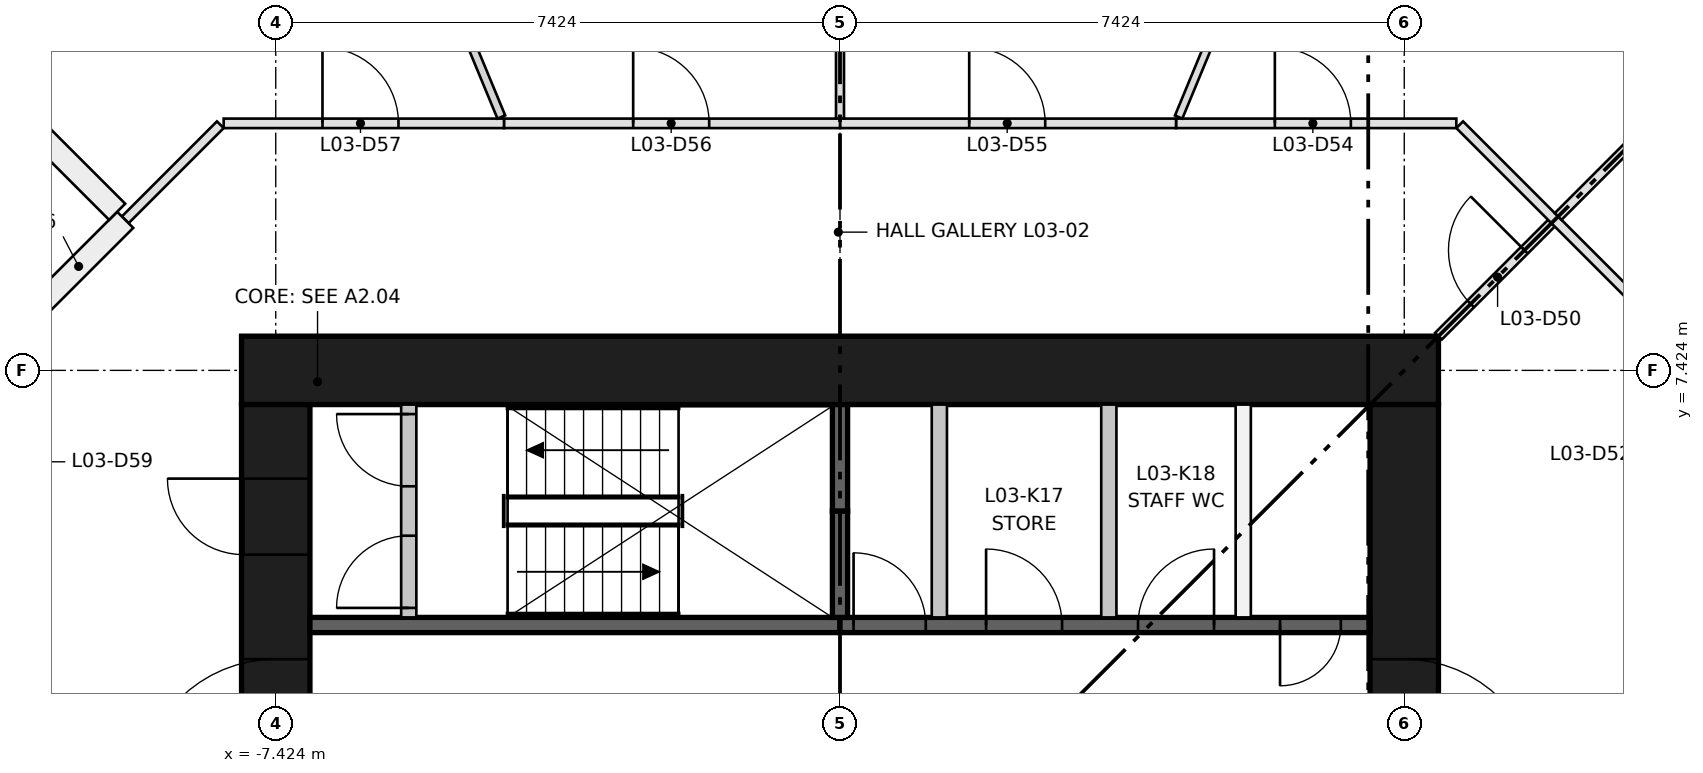
"""IFC4 building model, lengths in metres.
Left out: names, types, materials, properties, quantities, classifications, styles, units other than length and angle.
Written with IfcOpenShell. Run it as: python <this file> out.ifc"""

import sys

from ifc_helpers import new_model, si_unit, direction, frame, frame_2d, origin, place, context, subcontext, project, spatial, rectangle, extrude, element, fill, save


model = new_model("IFC4")
c1 = context("Model", 3, precision=1e-05, world=origin(), true_north=direction((0.0, 1.0)))
c2 = subcontext(c1, "Body", "Model", "MODEL_VIEW")
j1 = project(units=[si_unit("LENGTHUNIT", "METRE"), si_unit("PLANEANGLEUNIT", "RADIAN")], contexts=[c1])
p1 = place(None, origin())
s1 = spatial("IfcSite", under=j1, at=p1, CompositionType="ELEMENT")
p2 = place(p1, origin())
s2 = spatial("IfcBuilding", under=s1, at=p2, CompositionType="ELEMENT")
p3 = place(p2, frame((0.0, 0.0, 14.4)))
s3 = spatial("IfcBuildingStorey", under=s2, at=p3, CompositionType="ELEMENT", Elevation=14.4)
p4 = place(p3, frame((-7.874, 7.424, 0.0), z_axis=(0.0, 0.0, 1.0), x_axis=(1.0, 0.0, 0.0)))
e1 = element("IfcWall", 1, at=p4, inside=s3, PredefinedType="SHEAR", context=c2, shape_type="SweptSolid", body=[
    extrude(rectangle(XDim=15.748, YDim=0.9, at=frame_2d((7.874, 0.0))), origin(), (0.0, 0.0, 1.0), 4.1),
])
p5 = place(p3, frame((-7.424, -6.974, 0.0), z_axis=(0.0, 0.0, 1.0), x_axis=(0.0, 1.0, 0.0)))
e2 = element("IfcWall", 2, at=p5, inside=s3, PredefinedType="SHEAR", context=c2, shape_type="SweptSolid", body=[
    extrude(rectangle(XDim=13.948, YDim=0.9, at=frame_2d((6.974, 0.0))), origin(), (0.0, 0.0, 1.0), 4.1),
])
p6 = place(p5, frame((6.474, 0.0, 0.0)))
e3 = element("IfcOpeningElement", 3, at=p6, cuts=e2, PredefinedType="OPENING", context=c2, shape_type="SweptSolid", body=[
    extrude(rectangle(XDim=1.0, YDim=2.1, at=frame_2d((0.5, 1.05))), frame((0.0, 0.46, 0.0), z_axis=(0.0, -1.0, 0.0), x_axis=(1.0, 0.0, 0.0)), (0.0, 0.0, 1.0), 0.92),
])
p7 = place(p5, frame((3.35, 0.0, 0.0)))
e4 = element("IfcOpeningElement", 4, at=p7, cuts=e2, PredefinedType="OPENING", context=c2, shape_type="SweptSolid", body=[
    extrude(rectangle(XDim=1.8, YDim=2.1, at=frame_2d((0.9, 1.05))), frame((0.0, 0.46, 0.0), z_axis=(0.0, -1.0, 0.0), x_axis=(1.0, 0.0, 0.0)), (0.0, 0.0, 1.0), 0.92),
])
p8 = place(p5, frame((8.799, 0.0, 0.0)))
e5 = element("IfcOpeningElement", 5, at=p8, cuts=e2, PredefinedType="OPENING", context=c2, shape_type="SweptSolid", body=[
    extrude(rectangle(XDim=1.8, YDim=2.1, at=frame_2d((0.9, 1.05))), frame((0.0, 0.46, 0.0), z_axis=(0.0, -1.0, 0.0), x_axis=(1.0, 0.0, 0.0)), (0.0, 0.0, 1.0), 0.92),
])
p9 = place(p5, frame((11.974, 0.0, 0.0)))
e6 = element("IfcOpeningElement", 6, at=p9, cuts=e2, PredefinedType="OPENING", context=c2, shape_type="SweptSolid", body=[
    extrude(rectangle(XDim=1.0, YDim=2.1, at=frame_2d((0.5, 1.05))), frame((0.0, 0.46, 0.0), z_axis=(0.0, -1.0, 0.0), x_axis=(1.0, 0.0, 0.0)), (0.0, 0.0, 1.0), 0.92),
])
p10 = place(p3, frame((7.424, -6.974, 0.0), z_axis=(0.0, 0.0, 1.0), x_axis=(0.0, 1.0, 0.0)))
e7 = element("IfcWall", 7, at=p10, inside=s3, PredefinedType="SHEAR", context=c2, shape_type="SweptSolid", body=[
    extrude(rectangle(XDim=13.948, YDim=0.9, at=frame_2d((6.974, 0.0))), origin(), (0.0, 0.0, 1.0), 4.1),
])
p11 = place(p10, frame((6.474, 0.0, 0.0)))
e8 = element("IfcOpeningElement", 8, at=p11, cuts=e7, PredefinedType="OPENING", context=c2, shape_type="SweptSolid", body=[
    extrude(rectangle(XDim=1.0, YDim=2.1, at=frame_2d((0.5, 1.05))), frame((0.0, 0.46, 0.0), z_axis=(0.0, -1.0, 0.0), x_axis=(1.0, 0.0, 0.0)), (0.0, 0.0, 1.0), 0.92),
])
p12 = place(p10, frame((3.35, 0.0, 0.0)))
e9 = element("IfcOpeningElement", 9, at=p12, cuts=e7, PredefinedType="OPENING", context=c2, shape_type="SweptSolid", body=[
    extrude(rectangle(XDim=1.8, YDim=2.1, at=frame_2d((0.9, 1.05))), frame((0.0, 0.46, 0.0), z_axis=(0.0, -1.0, 0.0), x_axis=(1.0, 0.0, 0.0)), (0.0, 0.0, 1.0), 0.92),
])
p13 = place(p10, frame((8.799, 0.0, 0.0)))
e10 = element("IfcOpeningElement", 10, at=p13, cuts=e7, PredefinedType="OPENING", context=c2, shape_type="SweptSolid", body=[
    extrude(rectangle(XDim=1.8, YDim=2.1, at=frame_2d((0.9, 1.05))), frame((0.0, 0.46, 0.0), z_axis=(0.0, -1.0, 0.0), x_axis=(1.0, 0.0, 0.0)), (0.0, 0.0, 1.0), 0.92),
])
p14 = place(p3, frame((-6.974, 4.074, 0.0), z_axis=(0.0, 0.0, 1.0), x_axis=(1.0, 0.0, 0.0)))
e11 = element("IfcWall", 11, at=p14, inside=s3, PredefinedType="SHEAR", context=c2, shape_type="SweptSolid", body=[
    extrude(rectangle(XDim=6.974, YDim=0.2, at=frame_2d((3.487, 0.0))), origin(), (0.0, 0.0, 1.0), 3.7),
])
p15 = place(p3, frame((0.0, 4.074, 0.0), z_axis=(0.0, 0.0, 1.0), x_axis=(1.0, 0.0, 0.0)))
e12 = element("IfcWall", 12, at=p15, inside=s3, PredefinedType="SHEAR", context=c2, shape_type="SweptSolid", body=[
    extrude(rectangle(XDim=6.974, YDim=0.2, at=frame_2d((3.487, 0.0))), origin(), (0.0, 0.0, 1.0), 3.7),
])
p16 = place(p15, frame((0.179, 0.0, 0.0)))
e13 = element("IfcOpeningElement", 13, at=p16, cuts=e12, PredefinedType="OPENING", context=c2, shape_type="SweptSolid", body=[
    extrude(rectangle(XDim=0.95, YDim=2.1, at=frame_2d((0.475, 1.05))), frame((0.0, 0.11, 0.0), z_axis=(0.0, -1.0, 0.0), x_axis=(1.0, 0.0, 0.0)), (0.0, 0.0, 1.0), 0.22),
])
p17 = place(p15, frame((1.922, 0.0, 0.0)))
e14 = element("IfcOpeningElement", 14, at=p17, cuts=e12, PredefinedType="OPENING", context=c2, shape_type="SweptSolid", body=[
    extrude(rectangle(XDim=1.0, YDim=2.1, at=frame_2d((0.5, 1.05))), frame((0.0, 0.11, 0.0), z_axis=(0.0, -1.0, 0.0), x_axis=(1.0, 0.0, 0.0)), (0.0, 0.0, 1.0), 0.22),
])
p18 = place(p15, frame((3.921, 0.0, 0.0)))
e15 = element("IfcOpeningElement", 15, at=p18, cuts=e12, PredefinedType="OPENING", context=c2, shape_type="SweptSolid", body=[
    extrude(rectangle(XDim=1.0, YDim=2.1, at=frame_2d((0.5, 1.05))), frame((0.0, 0.11, 0.0), z_axis=(0.0, -1.0, 0.0), x_axis=(1.0, 0.0, 0.0)), (0.0, 0.0, 1.0), 0.22),
])
p19 = place(p15, frame((5.79, 0.0, 0.0)))
e16 = element("IfcOpeningElement", 16, at=p19, cuts=e12, PredefinedType="OPENING", context=c2, shape_type="SweptSolid", body=[
    extrude(rectangle(XDim=0.8, YDim=2.1, at=frame_2d((0.4, 1.05))), frame((0.0, 0.11, 0.0), z_axis=(0.0, -1.0, 0.0), x_axis=(1.0, 0.0, 0.0)), (0.0, 0.0, 1.0), 0.22),
])
p20 = place(p3, frame((0.0, 4.174, 0.0), z_axis=(0.0, 0.0, 1.0), x_axis=(0.0, 1.0, 0.0)))
e17 = element("IfcWall", 17, at=p20, inside=s3, PredefinedType="SHEAR", context=c2, shape_type="SweptSolid", body=[
    extrude(rectangle(XDim=1.4, YDim=0.2, at=frame_2d((0.7, 0.0))), origin(), (0.0, 0.0, 1.0), 3.7),
])
p21 = place(p3, frame((0.0, 5.574, 0.0), z_axis=(0.0, 0.0, 1.0), x_axis=(0.0, 1.0, 0.0)))
e18 = element("IfcWall", 18, at=p21, inside=s3, PredefinedType="SHEAR", context=c2, shape_type="SweptSolid", body=[
    extrude(rectangle(XDim=1.4, YDim=0.2, at=frame_2d((0.7, 0.0))), origin(), (0.0, 0.0, 1.0), 3.7),
])
for number, where, z_axis, x_axis in (
    (19, (1.307, 4.174, 0.0), (0.0, 0.0, 1.0), (0.0, 1.0, 0.0)),
    (20, (3.537, 4.174, 0.0), (0.0, 0.0, 1.0), (0.0, 1.0, 0.0)),
    (21, (5.305, 4.174, 0.0), (0.0, 0.0, 1.0), (0.0, 1.0, 0.0)),
):
    element("IfcWall", number, at=place(p3, frame(where, z_axis=z_axis, x_axis=x_axis)), inside=s3, PredefinedType="PARTITIONING", context=c2, shape_type="SweptSolid", body=[
        extrude(rectangle(XDim=2.8, YDim=0.2, at=frame_2d((1.4, 0.0))), origin(), (0.0, 0.0, 1.0), 3.7),
    ])
p22 = place(p3, frame((-5.674, 4.174, 0.0), z_axis=(0.0, 0.0, 1.0), x_axis=(0.0, 1.0, 0.0)))
e22 = element("IfcWall", 22, at=p22, inside=s3, PredefinedType="PARTITIONING", context=c2, shape_type="SweptSolid", body=[
    extrude(rectangle(XDim=2.8, YDim=0.2, at=frame_2d((1.4, 0.0))), origin(), (0.0, 0.0, 1.0), 3.7),
])
p23 = place(p22, frame((0.125, 0.0, 0.0)))
e23 = element("IfcOpeningElement", 23, at=p23, cuts=e22, PredefinedType="OPENING", context=c2, shape_type="SweptSolid", body=[
    extrude(rectangle(XDim=0.95, YDim=2.1, at=frame_2d((0.475, 1.05))), frame((0.0, 0.11, 0.0), z_axis=(0.0, -1.0, 0.0), x_axis=(1.0, 0.0, 0.0)), (0.0, 0.0, 1.0), 0.22),
])
p24 = place(p22, frame((1.725, 0.0, 0.0)))
e24 = element("IfcOpeningElement", 24, at=p24, cuts=e22, PredefinedType="OPENING", context=c2, shape_type="SweptSolid", body=[
    extrude(rectangle(XDim=0.95, YDim=2.1, at=frame_2d((0.475, 1.05))), frame((0.0, 0.11, 0.0), z_axis=(0.0, -1.0, 0.0), x_axis=(1.0, 0.0, 0.0)), (0.0, 0.0, 1.0), 0.22),
])
p25 = place(p3, frame((7.874, 7.874, 0.0), z_axis=(0.0, 0.0, 1.0), x_axis=(0.707106781187, 0.707106781187, 0.0)))
e25 = element("IfcWall", 25, at=p25, inside=s3, PredefinedType="PARTITIONING", context=c2, shape_type="SweptSolid", body=[
    extrude(rectangle(XDim=2.102, YDim=0.125, at=frame_2d((1.051, 0.0))), origin(), (0.0, 0.0, 1.0), 3.7),
])
p26 = place(p25, frame((0.6, 0.0, 0.0)))
e26 = element("IfcOpeningElement", 26, at=p26, cuts=e25, PredefinedType="OPENING", context=c2, shape_type="SweptSolid", body=[
    extrude(rectangle(XDim=1.0, YDim=2.1, at=frame_2d((0.5, 1.05))), frame((0.0, 0.073, 0.0), z_axis=(0.0, -1.0, 0.0), x_axis=(1.0, 0.0, 0.0)), (0.0, 0.0, 1.0), 0.145),
])
p27 = place(p3, frame((9.405, 9.405, 0.0), z_axis=(0.0, 0.0, 1.0), x_axis=(0.707106781187, -0.707106781187, 0.0)))
e27 = element("IfcWall", 27, at=p27, inside=s3, PredefinedType="PARTITIONING", context=c2, shape_type="SweptSolid", body=[
    extrude(rectangle(XDim=1.77, YDim=0.125, at=frame_2d((0.885, 0.0))), origin(), (0.0, 0.0, 1.0), 3.7),
])
p28 = place(p3, frame((4.421, 10.674, 0.0), z_axis=(0.0, 0.0, 1.0), x_axis=(1.0, 0.0, 0.0)))
e28 = element("IfcWall", 28, at=p28, inside=s3, PredefinedType="PARTITIONING", context=c2, shape_type="SweptSolid", body=[
    extrude(rectangle(XDim=3.688, YDim=0.125, at=frame_2d((1.844, 0.0))), origin(), (0.0, 0.0, 1.0), 3.7),
])
p29 = place(p28, frame((1.3, 0.0, 0.0)))
e29 = element("IfcOpeningElement", 29, at=p29, cuts=e28, PredefinedType="OPENING", context=c2, shape_type="SweptSolid", body=[
    extrude(rectangle(XDim=1.0, YDim=2.1, at=frame_2d((0.5, 1.05))), frame((0.0, 0.073, 0.0), z_axis=(0.0, -1.0, 0.0), x_axis=(1.0, 0.0, 0.0)), (0.0, 0.0, 1.0), 0.145),
])
p30 = place(p3, frame((8.153, 10.656, 0.0), z_axis=(0.0, 0.0, 1.0), x_axis=(0.707106781187, -0.707106781187, 0.0)))
e30 = element("IfcWall", 30, at=p30, inside=s3, PredefinedType="PARTITIONING", context=c2, shape_type="SweptSolid", body=[
    extrude(rectangle(XDim=1.77, YDim=0.125, at=frame_2d((0.885, 0.0))), origin(), (0.0, 0.0, 1.0), 3.7),
])
p31 = place(p3, frame((0.0, 10.674, 0.0), z_axis=(0.0, 0.0, 1.0), x_axis=(1.0, 0.0, 0.0)))
e31 = element("IfcWall", 31, at=p31, inside=s3, PredefinedType="PARTITIONING", context=c2, shape_type="SweptSolid", body=[
    extrude(rectangle(XDim=4.421, YDim=0.125, at=frame_2d((2.211, 0.0))), origin(), (0.0, 0.0, 1.0), 3.7),
])
p32 = place(p31, frame((1.7, 0.0, 0.0)))
e32 = element("IfcOpeningElement", 32, at=p32, cuts=e31, PredefinedType="OPENING", context=c2, shape_type="SweptSolid", body=[
    extrude(rectangle(XDim=1.0, YDim=2.1, at=frame_2d((0.5, 1.05))), frame((0.0, 0.073, 0.0), z_axis=(0.0, -1.0, 0.0), x_axis=(1.0, 0.0, 0.0)), (0.0, 0.0, 1.0), 0.145),
])
p33 = place(p3, frame((-4.421, 10.674, 0.0), z_axis=(0.0, 0.0, 1.0), x_axis=(1.0, 0.0, 0.0)))
e33 = element("IfcWall", 33, at=p33, inside=s3, PredefinedType="PARTITIONING", context=c2, shape_type="SweptSolid", body=[
    extrude(rectangle(XDim=4.421, YDim=0.125, at=frame_2d((2.211, 0.0))), origin(), (0.0, 0.0, 1.0), 3.7),
])
p34 = place(p33, frame((1.7, 0.0, 0.0)))
e34 = element("IfcOpeningElement", 34, at=p34, cuts=e33, PredefinedType="OPENING", context=c2, shape_type="SweptSolid", body=[
    extrude(rectangle(XDim=1.0, YDim=2.1, at=frame_2d((0.5, 1.05))), frame((0.0, 0.073, 0.0), z_axis=(0.0, -1.0, 0.0), x_axis=(1.0, 0.0, 0.0)), (0.0, 0.0, 1.0), 0.145),
])
p35 = place(p3, frame((-9.405, 9.405, 0.0), z_axis=(0.0, 0.0, 1.0), x_axis=(0.707106781187, 0.707106781187, 0.0)))
e35 = element("IfcWall", 35, at=p35, inside=s3, PredefinedType="PARTITIONING", context=c2, shape_type="SweptSolid", body=[
    extrude(rectangle(XDim=1.77, YDim=0.125, at=frame_2d((0.885, 0.0))), origin(), (0.0, 0.0, 1.0), 3.7),
])
p36 = place(p3, frame((-8.109, 10.674, 0.0), z_axis=(0.0, 0.0, 1.0), x_axis=(1.0, 0.0, 0.0)))
e36 = element("IfcWall", 36, at=p36, inside=s3, PredefinedType="PARTITIONING", context=c2, shape_type="SweptSolid", body=[
    extrude(rectangle(XDim=3.688, YDim=0.125, at=frame_2d((1.844, 0.0))), origin(), (0.0, 0.0, 1.0), 3.7),
])
p37 = place(p36, frame((1.3, 0.0, 0.0)))
e37 = element("IfcOpeningElement", 37, at=p37, cuts=e36, PredefinedType="OPENING", context=c2, shape_type="SweptSolid", body=[
    extrude(rectangle(XDim=1.0, YDim=2.1, at=frame_2d((0.5, 1.05))), frame((0.0, 0.073, 0.0), z_axis=(0.0, -1.0, 0.0), x_axis=(1.0, 0.0, 0.0)), (0.0, 0.0, 1.0), 0.145),
])
p38 = place(p3, frame((-10.63, 8.179, 0.0), z_axis=(0.0, 0.0, 1.0), x_axis=(0.707106781187, 0.707106781187, 0.0)))
e38 = element("IfcWall", 38, at=p38, inside=s3, PredefinedType="PARTITIONING", context=c2, shape_type="SweptSolid", body=[
    extrude(rectangle(XDim=1.733, YDim=0.3, at=frame_2d((0.867, 0.0))), origin(), (0.0, 0.0, 1.0), 3.7),
])
p39 = place(p3, frame((9.449, 9.449, 0.0), z_axis=(0.0, 0.0, 1.0), x_axis=(0.707106781187, 0.707106781187, 0.0)))
e39 = element("IfcWall", 39, at=p39, inside=s3, PredefinedType="PARTITIONING", context=c2, shape_type="SweptSolid", body=[
    extrude(rectangle(XDim=5.297, YDim=0.125, at=frame_2d((2.649, 0.0))), origin(), (0.0, 0.0, 1.0), 3.7),
])
p40 = place(p3, frame((4.456, 10.757, 0.0), z_axis=(0.0, 0.0, 1.0), x_axis=(0.382663149086, 0.92388793386, 0.0)))
e40 = element("IfcWall", 40, at=p40, inside=s3, PredefinedType="PARTITIONING", context=c2, shape_type="SweptSolid", body=[
    extrude(rectangle(XDim=3.047, YDim=0.105, at=frame_2d((1.523, 0.0))), origin(), (0.0, 0.0, 1.0), 3.7),
])
p41 = place(p3, frame((0.0, 10.737, 0.0), z_axis=(0.0, 0.0, 1.0), x_axis=(0.0, 1.0, 0.0)))
e41 = element("IfcWall", 41, at=p41, inside=s3, PredefinedType="PARTITIONING", context=c2, shape_type="SweptSolid", body=[
    extrude(rectangle(XDim=3.897, YDim=0.105, at=frame_2d((1.949, 0.0))), origin(), (0.0, 0.0, 1.0), 3.7),
])
p42 = place(p3, frame((-4.456, 10.758, 0.0), z_axis=(0.0, 0.0, 1.0), x_axis=(-0.382708078366, 0.923869323418, 0.0)))
e42 = element("IfcWall", 42, at=p42, inside=s3, PredefinedType="PARTITIONING", context=c2, shape_type="SweptSolid", body=[
    extrude(rectangle(XDim=3.046, YDim=0.11, at=frame_2d((1.523, 0.0))), origin(), (0.0, 0.0, 1.0), 3.7),
])
p43 = place(p3, frame((-9.51, 9.51, 0.0), z_axis=(0.0, 0.0, 1.0), x_axis=(-0.707106781187, 0.707106781187, 0.0)))
e43 = element("IfcWall", 43, at=p43, inside=s3, PredefinedType="PARTITIONING", context=c2, shape_type="SweptSolid", body=[
    extrude(rectangle(XDim=5.21, YDim=0.3, at=frame_2d((2.605, 0.0))), origin(), (0.0, 0.0, 1.0), 3.7),
])
p44 = place(p23, origin())
e44 = element("IfcDoor", 44, at=p44, inside=s3, OperationType="SINGLE_SWING_LEFT", PredefinedType="DOOR", context=c2, shape_type="SweptSolid", body=[
    extrude(rectangle(XDim=0.95, YDim=2.1, at=frame_2d((0.475, 1.05))), frame((0.0, 0.025, 0.0), z_axis=(0.0, -1.0, 0.0), x_axis=(1.0, 0.0, 0.0)), (0.0, 0.0, 1.0), 0.05),
])
fill(e23, e44)
p45 = place(p24, origin())
e45 = element("IfcDoor", 45, at=p45, inside=s3, OperationType="SINGLE_SWING_RIGHT", PredefinedType="DOOR", context=c2, shape_type="SweptSolid", body=[
    extrude(rectangle(XDim=0.95, YDim=2.1, at=frame_2d((0.475, 1.05))), frame((0.0, 0.025, 0.0), z_axis=(0.0, -1.0, 0.0), x_axis=(1.0, 0.0, 0.0)), (0.0, 0.0, 1.0), 0.05),
])
fill(e24, e45)
p46 = place(p16, origin())
e46 = element("IfcDoor", 46, at=p46, inside=s3, OperationType="SINGLE_SWING_LEFT", PredefinedType="DOOR", context=c2, shape_type="SweptSolid", body=[
    extrude(rectangle(XDim=0.95, YDim=2.1, at=frame_2d((0.475, 1.05))), frame((0.0, 0.025, 0.0), z_axis=(0.0, -1.0, 0.0), x_axis=(1.0, 0.0, 0.0)), (0.0, 0.0, 1.0), 0.05),
])
fill(e13, e46)
p47 = place(p17, origin())
e47 = element("IfcDoor", 47, at=p47, inside=s3, OperationType="SINGLE_SWING_LEFT", PredefinedType="DOOR", context=c2, shape_type="SweptSolid", body=[
    extrude(rectangle(XDim=1.0, YDim=2.1, at=frame_2d((0.5, 1.05))), frame((0.0, 0.025, 0.0), z_axis=(0.0, -1.0, 0.0), x_axis=(1.0, 0.0, 0.0)), (0.0, 0.0, 1.0), 0.05),
])
fill(e14, e47)
p48 = place(p18, origin())
e48 = element("IfcDoor", 48, at=p48, inside=s3, OperationType="SINGLE_SWING_RIGHT", PredefinedType="DOOR", context=c2, shape_type="SweptSolid", body=[
    extrude(rectangle(XDim=1.0, YDim=2.1, at=frame_2d((0.5, 1.05))), frame((0.0, 0.025, 0.0), z_axis=(0.0, -1.0, 0.0), x_axis=(1.0, 0.0, 0.0)), (0.0, 0.0, 1.0), 0.05),
])
fill(e15, e48)
p49 = place(p19, frame((0.8, 0.0, 0.0), z_axis=(0.0, 0.0, 1.0), x_axis=(-1.0, 0.0, 0.0)))
e49 = element("IfcDoor", 49, at=p49, inside=s3, OperationType="SINGLE_SWING_LEFT", PredefinedType="DOOR", context=c2, shape_type="SweptSolid", body=[
    extrude(rectangle(XDim=0.8, YDim=2.1, at=frame_2d((0.4, 1.05))), frame((0.0, 0.025, 0.0), z_axis=(0.0, -1.0, 0.0), x_axis=(1.0, 0.0, 0.0)), (0.0, 0.0, 1.0), 0.05),
])
fill(e16, e49)
p50 = place(p8, origin())
e50 = element("IfcDoor", 50, at=p50, inside=s3, OperationType="DOUBLE_DOOR_SINGLE_SWING", PredefinedType="DOOR", context=c2, shape_type="SweptSolid", body=[
    extrude(rectangle(XDim=1.8, YDim=2.1, at=frame_2d((0.9, 1.05))), frame((0.0, 0.025, 0.0), z_axis=(0.0, -1.0, 0.0), x_axis=(1.0, 0.0, 0.0)), (0.0, 0.0, 1.0), 0.05),
])
fill(e5, e50)
p51 = place(p9, origin())
e51 = element("IfcDoor", 51, at=p51, inside=s3, OperationType="SINGLE_SWING_RIGHT", PredefinedType="DOOR", context=c2, shape_type="SweptSolid", body=[
    extrude(rectangle(XDim=1.0, YDim=2.1, at=frame_2d((0.5, 1.05))), frame((0.0, 0.45, 0.0), z_axis=(0.0, -1.0, 0.0), x_axis=(1.0, 0.0, 0.0)), (0.0, 0.0, 1.0), 0.05),
])
fill(e6, e51)
p52 = place(p13, frame((1.8, 0.0, 0.0), z_axis=(0.0, 0.0, 1.0), x_axis=(-1.0, 0.0, 0.0)))
e52 = element("IfcDoor", 52, at=p52, inside=s3, OperationType="DOUBLE_DOOR_SINGLE_SWING", PredefinedType="DOOR", context=c2, shape_type="SweptSolid", body=[
    extrude(rectangle(XDim=1.8, YDim=2.1, at=frame_2d((0.9, 1.05))), frame((0.0, 0.025, 0.0), z_axis=(0.0, -1.0, 0.0), x_axis=(1.0, 0.0, 0.0)), (0.0, 0.0, 1.0), 0.05),
])
fill(e10, e52)
p53 = place(p26, origin())
e53 = element("IfcDoor", 53, at=p53, inside=s3, OperationType="SINGLE_SWING_RIGHT", PredefinedType="DOOR", context=c2, shape_type="SweptSolid", body=[
    extrude(rectangle(XDim=1.0, YDim=2.1, at=frame_2d((0.5, 1.05))), frame((0.0, 0.025, 0.0), z_axis=(0.0, -1.0, 0.0), x_axis=(1.0, 0.0, 0.0)), (0.0, 0.0, 1.0), 0.05),
])
fill(e26, e53)
p54 = place(p29, origin())
e54 = element("IfcDoor", 54, at=p54, inside=s3, OperationType="SINGLE_SWING_LEFT", PredefinedType="DOOR", context=c2, shape_type="SweptSolid", body=[
    extrude(rectangle(XDim=1.0, YDim=2.1, at=frame_2d((0.5, 1.05))), frame((0.0, 0.025, 0.0), z_axis=(0.0, -1.0, 0.0), x_axis=(1.0, 0.0, 0.0)), (0.0, 0.0, 1.0), 0.05),
])
fill(e29, e54)
p55 = place(p32, origin())
e55 = element("IfcDoor", 55, at=p55, inside=s3, OperationType="SINGLE_SWING_LEFT", PredefinedType="DOOR", context=c2, shape_type="SweptSolid", body=[
    extrude(rectangle(XDim=1.0, YDim=2.1, at=frame_2d((0.5, 1.05))), frame((0.0, 0.025, 0.0), z_axis=(0.0, -1.0, 0.0), x_axis=(1.0, 0.0, 0.0)), (0.0, 0.0, 1.0), 0.05),
])
fill(e32, e55)
p56 = place(p34, origin())
e56 = element("IfcDoor", 56, at=p56, inside=s3, OperationType="SINGLE_SWING_LEFT", PredefinedType="DOOR", context=c2, shape_type="SweptSolid", body=[
    extrude(rectangle(XDim=1.0, YDim=2.1, at=frame_2d((0.5, 1.05))), frame((0.0, 0.025, 0.0), z_axis=(0.0, -1.0, 0.0), x_axis=(1.0, 0.0, 0.0)), (0.0, 0.0, 1.0), 0.05),
])
fill(e34, e56)
p57 = place(p37, origin())
e57 = element("IfcDoor", 57, at=p57, inside=s3, OperationType="SINGLE_SWING_LEFT", PredefinedType="DOOR", context=c2, shape_type="SweptSolid", body=[
    extrude(rectangle(XDim=1.0, YDim=2.1, at=frame_2d((0.5, 1.05))), frame((0.0, 0.025, 0.0), z_axis=(0.0, -1.0, 0.0), x_axis=(1.0, 0.0, 0.0)), (0.0, 0.0, 1.0), 0.05),
])
fill(e37, e57)
save(model, sys.argv[1])
